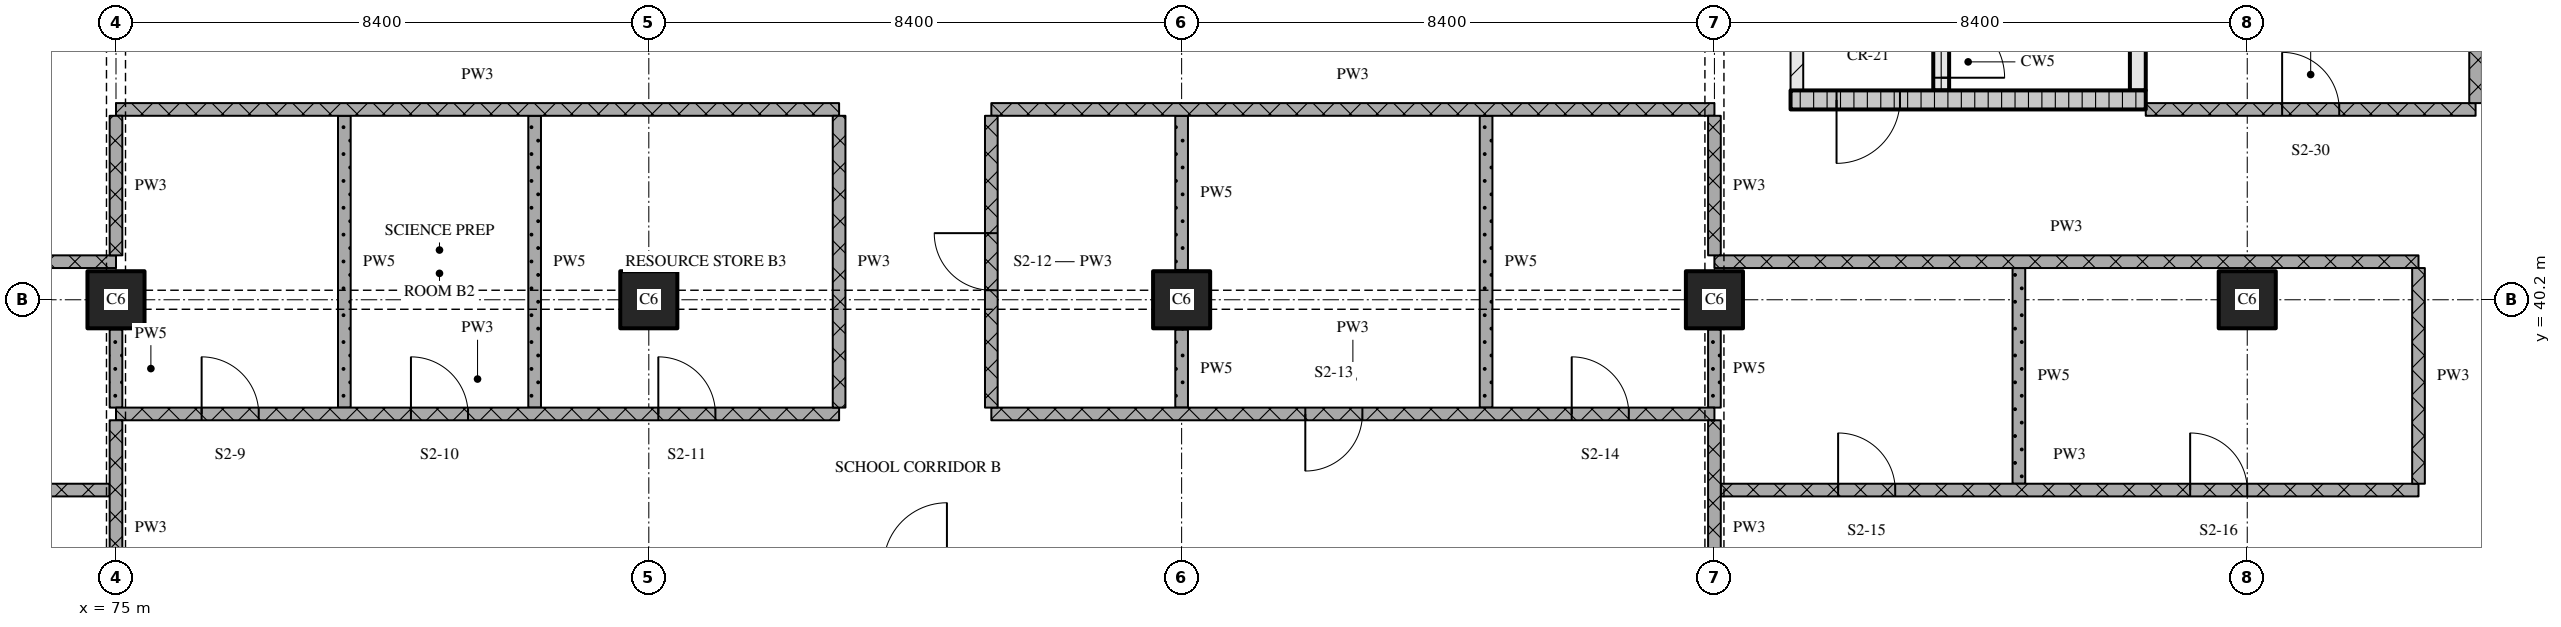
"""IFC4 building model, lengths in metres.
Left out: names, types, materials, properties, quantities, classifications, styles, units other than length and angle.
Written with IfcOpenShell. Run it as: python <this file> out.ifc"""

import sys

from ifc_helpers import new_model, si_unit, direction, frame, frame_2d, origin, origin_2d, place, context, subcontext, project, spatial, rectangle, extrude, element, fill, save


model = new_model("IFC4")
c1 = context("Model", 3, precision=1e-05, world=origin(), true_north=direction((0.0, 1.0)))
c2 = subcontext(c1, "Body", "Model", "MODEL_VIEW")
j1 = project(units=[si_unit("LENGTHUNIT", "METRE"), si_unit("PLANEANGLEUNIT", "RADIAN")], contexts=[c1])
p1 = place(None, origin())
s1 = spatial("IfcSite", under=j1, at=p1, CompositionType="ELEMENT")
p2 = place(p1, origin())
s2 = spatial("IfcBuilding", under=s1, at=p2, CompositionType="ELEMENT")
p3 = place(p2, frame((0.0, 0.0, 28.2)))
s3 = spatial("IfcBuildingStorey", under=s2, at=p3, CompositionType="ELEMENT", Elevation=28.2)
for number, where, z_axis, x_axis in (
    (1, (75.0, 40.2, 0.0), (0.0, 0.0, 1.0), (1.0, 0.0, 0.0)),
    (2, (83.4, 40.2, 0.0), (0.0, 0.0, 1.0), (1.0, 0.0, 0.0)),
    (3, (91.8, 40.2, 0.0), (0.0, 0.0, 1.0), (1.0, 0.0, 0.0)),
    (4, (100.2, 40.2, 0.0), (0.0, 0.0, 1.0), (1.0, 0.0, 0.0)),
    (5, (108.6, 40.2, 0.0), (0.0, 0.0, 1.0), (1.0, 0.0, 0.0)),
):
    element("IfcColumn", number, at=place(p3, frame(where, z_axis=z_axis, x_axis=x_axis)), inside=s3, PredefinedType="COLUMN", context=c2, shape_type="SweptSolid", body=[
        extrude(rectangle(XDim=0.9, YDim=0.9, at=origin_2d()), origin(), (0.0, 0.0, 1.0), 4.5),
    ])
p4 = place(p3, frame((101.4, 43.35, 0.0), z_axis=(0.0, 0.0, 1.0), x_axis=(1.0, 0.0, 0.0)))
e6 = element("IfcWall", 6, at=p4, inside=s3, PredefinedType="SOLIDWALL", context=c2, shape_type="SweptSolid", body=[
    extrude(rectangle(XDim=5.6, YDim=0.3, at=frame_2d((2.8, 0.0))), origin(), (0.0, 0.0, 1.0), 4.2),
])
p5 = place(p4, frame((0.725, 0.0, 0.0)))
e7 = element("IfcOpeningElement", 7, at=p5, cuts=e6, PredefinedType="OPENING", context=c2, shape_type="SweptSolid", body=[
    extrude(rectangle(XDim=1.0, YDim=2.1, at=frame_2d((0.5, 1.05))), frame((0.0, 0.16, 0.0), z_axis=(0.0, -1.0, 0.0), x_axis=(1.0, 0.0, 0.0)), (0.0, 0.0, 1.0), 0.32),
])
p6 = place(p3, frame((101.5, 43.5, 0.0), z_axis=(0.0, 0.0, 1.0), x_axis=(0.0, 1.0, 0.0)))
e8 = element("IfcWall", 8, at=p6, inside=s3, PredefinedType="PARTITIONING", context=c2, shape_type="SweptSolid", body=[
    extrude(rectangle(XDim=6.9, YDim=0.2, at=frame_2d((3.45, 0.0))), origin(), (0.0, 0.0, 1.0), 4.2),
])
p7 = place(p6, frame((1.0, 0.0, 0.0)))
e9 = element("IfcOpeningElement", 9, at=p7, cuts=e8, PredefinedType="OPENING", context=c2, shape_type="SweptSolid", body=[
    extrude(rectangle(XDim=1.0, YDim=2.1, at=frame_2d((0.5, 1.05))), frame((0.0, 0.11, 0.0), z_axis=(0.0, -1.0, 0.0), x_axis=(1.0, 0.0, 0.0)), (0.0, 0.0, 1.0), 0.22),
])
p8 = place(p3, frame((103.775, 43.5, 0.0), z_axis=(0.0, 0.0, 1.0), x_axis=(0.0, 1.0, 0.0)))
e10 = element("IfcWall", 10, at=p8, inside=s3, PredefinedType="SOLIDWALL", context=c2, shape_type="SweptSolid", body=[
    extrude(rectangle(XDim=6.9, YDim=0.25, at=frame_2d((3.45, 0.0))), origin(), (0.0, 0.0, 1.0), 4.2),
])
p9 = place(p8, frame((0.2, 0.0, 0.0)))
e11 = element("IfcOpeningElement", 11, at=p9, cuts=e10, PredefinedType="OPENING", context=c2, shape_type="SweptSolid", body=[
    extrude(rectangle(XDim=1.0, YDim=2.1, at=frame_2d((0.5, 1.05))), frame((0.0, 0.135, 0.0), z_axis=(0.0, -1.0, 0.0), x_axis=(1.0, 0.0, 0.0)), (0.0, 0.0, 1.0), 0.27),
])
p10 = place(p3, frame((106.875, 43.5, 0.0), z_axis=(0.0, 0.0, 1.0), x_axis=(0.0, 1.0, 0.0)))
e12 = element("IfcWall", 12, at=p10, inside=s3, PredefinedType="SOLIDWALL", context=c2, shape_type="SweptSolid", body=[
    extrude(rectangle(XDim=6.9, YDim=0.25, at=frame_2d((3.45, 0.0))), origin(), (0.0, 0.0, 1.0), 4.2),
])
p11 = place(p3, frame((63.9, 37.2, 0.0), z_axis=(0.0, 0.0, 1.0), x_axis=(1.0, 0.0, 0.0)))
e13 = element("IfcWall", 13, at=p11, inside=s3, PredefinedType="PARTITIONING", context=c2, shape_type="SweptSolid", body=[
    extrude(rectangle(XDim=11.0, YDim=0.2, at=frame_2d((5.5, 0.0))), origin(), (0.0, 0.0, 1.0), 4.2),
])
p12 = place(p11, frame((7.5, 0.0, 0.0)))
e14 = element("IfcOpeningElement", 14, at=p12, cuts=e13, PredefinedType="OPENING", context=c2, shape_type="SweptSolid", body=[
    extrude(rectangle(XDim=0.9, YDim=2.1, at=frame_2d((0.45, 1.05))), frame((0.0, 0.11, 0.0), z_axis=(0.0, -1.0, 0.0), x_axis=(1.0, 0.0, 0.0)), (0.0, 0.0, 1.0), 0.22),
])
p13 = place(p3, frame((100.3, 37.2, 0.0), z_axis=(0.0, 0.0, 1.0), x_axis=(1.0, 0.0, 0.0)))
e15 = element("IfcWall", 15, at=p13, inside=s3, PredefinedType="PARTITIONING", context=c2, shape_type="SweptSolid", body=[
    extrude(rectangle(XDim=11.0, YDim=0.2, at=frame_2d((5.5, 0.0))), origin(), (0.0, 0.0, 1.0), 4.2),
])
p14 = place(p13, frame((1.85, 0.0, 0.0)))
e16 = element("IfcOpeningElement", 16, at=p14, cuts=e15, PredefinedType="OPENING", context=c2, shape_type="SweptSolid", body=[
    extrude(rectangle(XDim=0.9, YDim=2.1, at=frame_2d((0.45, 1.05))), frame((0.0, 0.11, 0.0), z_axis=(0.0, -1.0, 0.0), x_axis=(1.0, 0.0, 0.0)), (0.0, 0.0, 1.0), 0.22),
])
p15 = place(p13, frame((7.4, 0.0, 0.0)))
e17 = element("IfcOpeningElement", 17, at=p15, cuts=e15, PredefinedType="OPENING", context=c2, shape_type="SweptSolid", body=[
    extrude(rectangle(XDim=0.9, YDim=2.1, at=frame_2d((0.45, 1.05))), frame((0.0, 0.11, 0.0), z_axis=(0.0, -1.0, 0.0), x_axis=(1.0, 0.0, 0.0)), (0.0, 0.0, 1.0), 0.22),
])
p16 = place(p3, frame((75.0, 38.4, 0.0), z_axis=(0.0, 0.0, 1.0), x_axis=(1.0, 0.0, 0.0)))
e18 = element("IfcWall", 18, at=p16, inside=s3, PredefinedType="PARTITIONING", context=c2, shape_type="SweptSolid", body=[
    extrude(rectangle(XDim=11.4, YDim=0.2, at=frame_2d((5.7, 0.0))), origin(), (0.0, 0.0, 1.0), 4.2),
])
p17 = place(p16, frame((1.35, 0.0, 0.0)))
e19 = element("IfcOpeningElement", 19, at=p17, cuts=e18, PredefinedType="OPENING", context=c2, shape_type="SweptSolid", body=[
    extrude(rectangle(XDim=0.9, YDim=2.1, at=frame_2d((0.45, 1.05))), frame((0.0, 0.11, 0.0), z_axis=(0.0, -1.0, 0.0), x_axis=(1.0, 0.0, 0.0)), (0.0, 0.0, 1.0), 0.22),
])
p18 = place(p16, frame((4.65, 0.0, 0.0)))
e20 = element("IfcOpeningElement", 20, at=p18, cuts=e18, PredefinedType="OPENING", context=c2, shape_type="SweptSolid", body=[
    extrude(rectangle(XDim=0.9, YDim=2.1, at=frame_2d((0.45, 1.05))), frame((0.0, 0.11, 0.0), z_axis=(0.0, -1.0, 0.0), x_axis=(1.0, 0.0, 0.0)), (0.0, 0.0, 1.0), 0.22),
])
p19 = place(p16, frame((8.55, 0.0, 0.0)))
e21 = element("IfcOpeningElement", 21, at=p19, cuts=e18, PredefinedType="OPENING", context=c2, shape_type="SweptSolid", body=[
    extrude(rectangle(XDim=0.9, YDim=2.1, at=frame_2d((0.45, 1.05))), frame((0.0, 0.11, 0.0), z_axis=(0.0, -1.0, 0.0), x_axis=(1.0, 0.0, 0.0)), (0.0, 0.0, 1.0), 0.22),
])
p20 = place(p3, frame((88.8, 38.4, 0.0), z_axis=(0.0, 0.0, 1.0), x_axis=(1.0, 0.0, 0.0)))
e22 = element("IfcWall", 22, at=p20, inside=s3, PredefinedType="PARTITIONING", context=c2, shape_type="SweptSolid", body=[
    extrude(rectangle(XDim=11.4, YDim=0.2, at=frame_2d((5.7, 0.0))), origin(), (0.0, 0.0, 1.0), 4.2),
])
p21 = place(p20, frame((4.95, 0.0, 0.0)))
e23 = element("IfcOpeningElement", 23, at=p21, cuts=e22, PredefinedType="OPENING", context=c2, shape_type="SweptSolid", body=[
    extrude(rectangle(XDim=0.9, YDim=2.1, at=frame_2d((0.45, 1.05))), frame((0.0, 0.11, 0.0), z_axis=(0.0, -1.0, 0.0), x_axis=(1.0, 0.0, 0.0)), (0.0, 0.0, 1.0), 0.22),
])
p22 = place(p20, frame((9.15, 0.0, 0.0)))
e24 = element("IfcOpeningElement", 24, at=p22, cuts=e22, PredefinedType="OPENING", context=c2, shape_type="SweptSolid", body=[
    extrude(rectangle(XDim=0.9, YDim=2.1, at=frame_2d((0.45, 1.05))), frame((0.0, 0.11, 0.0), z_axis=(0.0, -1.0, 0.0), x_axis=(1.0, 0.0, 0.0)), (0.0, 0.0, 1.0), 0.22),
])
for number, where, z_axis, x_axis in (
    (25, (63.9, 40.8, 0.0), (0.0, 0.0, 1.0), (1.0, 0.0, 0.0)),
    (26, (100.2, 40.8, 0.0), (0.0, 0.0, 1.0), (1.0, 0.0, 0.0)),
):
    element("IfcWall", number, at=place(p3, frame(where, z_axis=z_axis, x_axis=x_axis)), inside=s3, PredefinedType="PARTITIONING", context=c2, shape_type="SweptSolid", body=[
        extrude(rectangle(XDim=11.1, YDim=0.2, at=frame_2d((5.55, 0.0))), origin(), (0.0, 0.0, 1.0), 4.2),
    ])
for number, where, z_axis, x_axis in (
    (27, (75.0, 43.2, 0.0), (0.0, 0.0, 1.0), (1.0, 0.0, 0.0)),
    (28, (88.8, 43.2, 0.0), (0.0, 0.0, 1.0), (1.0, 0.0, 0.0)),
):
    element("IfcWall", number, at=place(p3, frame(where, z_axis=z_axis, x_axis=x_axis)), inside=s3, PredefinedType="PARTITIONING", context=c2, shape_type="SweptSolid", body=[
        extrude(rectangle(XDim=11.4, YDim=0.2, at=frame_2d((5.7, 0.0))), origin(), (0.0, 0.0, 1.0), 4.2),
    ])
p23 = place(p3, frame((107.0, 43.2, 0.0), z_axis=(0.0, 0.0, 1.0), x_axis=(1.0, 0.0, 0.0)))
e29 = element("IfcWall", 29, at=p23, inside=s3, PredefinedType="PARTITIONING", context=c2, shape_type="SweptSolid", body=[
    extrude(rectangle(XDim=5.2, YDim=0.2, at=frame_2d((2.6, 0.0))), origin(), (0.0, 0.0, 1.0), 4.2),
])
p24 = place(p23, frame((2.15, 0.0, 0.0)))
e30 = element("IfcOpeningElement", 30, at=p24, cuts=e29, PredefinedType="OPENING", context=c2, shape_type="SweptSolid", body=[
    extrude(rectangle(XDim=0.9, YDim=2.1, at=frame_2d((0.45, 1.05))), frame((0.0, 0.11, 0.0), z_axis=(0.0, -1.0, 0.0), x_axis=(1.0, 0.0, 0.0)), (0.0, 0.0, 1.0), 0.22),
])
p25 = place(p3, frame((75.0, 38.3, 0.0), z_axis=(0.0, 0.0, 1.0), x_axis=(0.0, -1.0, 0.0)))
e31 = element("IfcWall", 31, at=p25, inside=s3, PredefinedType="PARTITIONING", context=c2, shape_type="SweptSolid", body=[
    extrude(rectangle(XDim=3.4, YDim=0.2, at=frame_2d((1.7, 0.0))), origin(), (0.0, 0.0, 1.0), 3.7),
])
p26 = place(p3, frame((75.0, 43.1, 0.0), z_axis=(0.0, 0.0, 1.0), x_axis=(0.0, -1.0, 0.0)))
e32 = element("IfcWall", 32, at=p26, inside=s3, PredefinedType="PARTITIONING", context=c2, shape_type="SweptSolid", body=[
    extrude(rectangle(XDim=2.2, YDim=0.2, at=frame_2d((1.1, 0.0))), origin(), (0.0, 0.0, 1.0), 3.3),
])
p27 = place(p3, frame((75.0, 39.73, 0.0), z_axis=(0.0, 0.0, 1.0), x_axis=(0.0, -1.0, 0.0)))
e33 = element("IfcWall", 33, at=p27, inside=s3, PredefinedType="PARTITIONING", context=c2, shape_type="SweptSolid", body=[
    extrude(rectangle(XDim=1.23, YDim=0.2, at=frame_2d((0.615, 0.0))), origin(), (0.0, 0.0, 1.0), 3.7),
])
for number, where, z_axis, x_axis in (
    (34, (78.6, 43.1, 0.0), (0.0, 0.0, 1.0), (0.0, -1.0, 0.0)),
    (35, (81.6, 43.1, 0.0), (0.0, 0.0, 1.0), (0.0, -1.0, 0.0)),
    (36, (86.4, 43.1, 0.0), (0.0, 0.0, 1.0), (0.0, -1.0, 0.0)),
):
    element("IfcWall", number, at=place(p3, frame(where, z_axis=z_axis, x_axis=x_axis)), inside=s3, PredefinedType="PARTITIONING", context=c2, shape_type="SweptSolid", body=[
        extrude(rectangle(XDim=4.6, YDim=0.2, at=frame_2d((2.3, 0.0))), origin(), (0.0, 0.0, 1.0), 4.2),
    ])
p28 = place(p3, frame((88.8, 43.1, 0.0), z_axis=(0.0, 0.0, 1.0), x_axis=(0.0, -1.0, 0.0)))
e37 = element("IfcWall", 37, at=p28, inside=s3, PredefinedType="PARTITIONING", context=c2, shape_type="SweptSolid", body=[
    extrude(rectangle(XDim=4.6, YDim=0.2, at=frame_2d((2.3, 0.0))), origin(), (0.0, 0.0, 1.0), 4.2),
])
p29 = place(p28, frame((1.85, 0.0, 0.0)))
e38 = element("IfcOpeningElement", 38, at=p29, cuts=e37, PredefinedType="OPENING", context=c2, shape_type="SweptSolid", body=[
    extrude(rectangle(XDim=0.9, YDim=2.1, at=frame_2d((0.45, 1.05))), frame((0.0, 0.11, 0.0), z_axis=(0.0, -1.0, 0.0), x_axis=(1.0, 0.0, 0.0)), (0.0, 0.0, 1.0), 0.22),
])
p30 = place(p3, frame((91.8, 39.73, 0.0), z_axis=(0.0, 0.0, 1.0), x_axis=(0.0, -1.0, 0.0)))
e39 = element("IfcWall", 39, at=p30, inside=s3, PredefinedType="PARTITIONING", context=c2, shape_type="SweptSolid", body=[
    extrude(rectangle(XDim=1.23, YDim=0.2, at=frame_2d((0.615, 0.0))), origin(), (0.0, 0.0, 1.0), 4.2),
])
p31 = place(p3, frame((91.8, 43.1, 0.0), z_axis=(0.0, 0.0, 1.0), x_axis=(0.0, -1.0, 0.0)))
e40 = element("IfcWall", 40, at=p31, inside=s3, PredefinedType="PARTITIONING", context=c2, shape_type="SweptSolid", body=[
    extrude(rectangle(XDim=2.43, YDim=0.2, at=frame_2d((1.215, 0.0))), origin(), (0.0, 0.0, 1.0), 4.2),
])
p32 = place(p3, frame((96.6, 43.1, 0.0), z_axis=(0.0, 0.0, 1.0), x_axis=(0.0, -1.0, 0.0)))
e41 = element("IfcWall", 41, at=p32, inside=s3, PredefinedType="PARTITIONING", context=c2, shape_type="SweptSolid", body=[
    extrude(rectangle(XDim=4.6, YDim=0.2, at=frame_2d((2.3, 0.0))), origin(), (0.0, 0.0, 1.0), 4.2),
])
p33 = place(p3, frame((100.2, 38.3, 0.0), z_axis=(0.0, 0.0, 1.0), x_axis=(0.0, -1.0, 0.0)))
e42 = element("IfcWall", 42, at=p33, inside=s3, PredefinedType="PARTITIONING", context=c2, shape_type="SweptSolid", body=[
    extrude(rectangle(XDim=3.4, YDim=0.2, at=frame_2d((1.7, 0.0))), origin(), (0.0, 0.0, 1.0), 3.7),
])
p34 = place(p3, frame((100.2, 43.1, 0.0), z_axis=(0.0, 0.0, 1.0), x_axis=(0.0, -1.0, 0.0)))
e43 = element("IfcWall", 43, at=p34, inside=s3, PredefinedType="PARTITIONING", context=c2, shape_type="SweptSolid", body=[
    extrude(rectangle(XDim=2.2, YDim=0.2, at=frame_2d((1.1, 0.0))), origin(), (0.0, 0.0, 1.0), 3.3),
])
p35 = place(p3, frame((100.2, 39.73, 0.0), z_axis=(0.0, 0.0, 1.0), x_axis=(0.0, -1.0, 0.0)))
e44 = element("IfcWall", 44, at=p35, inside=s3, PredefinedType="PARTITIONING", context=c2, shape_type="SweptSolid", body=[
    extrude(rectangle(XDim=1.23, YDim=0.2, at=frame_2d((0.615, 0.0))), origin(), (0.0, 0.0, 1.0), 3.7),
])
for number, where, z_axis, x_axis in (
    (45, (105.0, 40.7, 0.0), (0.0, 0.0, 1.0), (0.0, -1.0, 0.0)),
    (46, (111.3, 40.7, 0.0), (0.0, 0.0, 1.0), (0.0, -1.0, 0.0)),
):
    element("IfcWall", number, at=place(p3, frame(where, z_axis=z_axis, x_axis=x_axis)), inside=s3, PredefinedType="PARTITIONING", context=c2, shape_type="SweptSolid", body=[
        extrude(rectangle(XDim=3.4, YDim=0.2, at=frame_2d((1.7, 0.0))), origin(), (0.0, 0.0, 1.0), 4.2),
    ])
p36 = place(p3, frame((112.2, 43.3, 0.0), z_axis=(0.0, 0.0, 1.0), x_axis=(0.0, 1.0, 0.0)))
e47 = element("IfcWall", 47, at=p36, inside=s3, PredefinedType="PARTITIONING", context=c2, shape_type="SweptSolid", body=[
    extrude(rectangle(XDim=15.4, YDim=0.2, at=frame_2d((7.7, 0.0))), origin(), (0.0, 0.0, 1.0), 4.2),
])
p37 = place(p36, frame((7.962, 0.0, 0.0)))
e48 = element("IfcOpeningElement", 48, at=p37, cuts=e47, PredefinedType="OPENING", context=c2, shape_type="SweptSolid", body=[
    extrude(rectangle(XDim=0.9, YDim=2.1, at=frame_2d((0.45, 1.05))), frame((0.0, 0.11, 0.0), z_axis=(0.0, -1.0, 0.0), x_axis=(1.0, 0.0, 0.0)), (0.0, 0.0, 1.0), 0.22),
])
p38 = place(p36, frame((9.988, 0.0, 0.0)))
e49 = element("IfcOpeningElement", 49, at=p38, cuts=e47, PredefinedType="OPENING", context=c2, shape_type="SweptSolid", body=[
    extrude(rectangle(XDim=0.9, YDim=2.1, at=frame_2d((0.45, 1.05))), frame((0.0, 0.11, 0.0), z_axis=(0.0, -1.0, 0.0), x_axis=(1.0, 0.0, 0.0)), (0.0, 0.0, 1.0), 0.22),
])
p39 = place(p36, frame((12.012, 0.0, 0.0)))
e50 = element("IfcOpeningElement", 50, at=p39, cuts=e47, PredefinedType="OPENING", context=c2, shape_type="SweptSolid", body=[
    extrude(rectangle(XDim=0.9, YDim=2.1, at=frame_2d((0.45, 1.05))), frame((0.0, 0.11, 0.0), z_axis=(0.0, -1.0, 0.0), x_axis=(1.0, 0.0, 0.0)), (0.0, 0.0, 1.0), 0.22),
])
p40 = place(p36, frame((14.038, 0.0, 0.0)))
e51 = element("IfcOpeningElement", 51, at=p40, cuts=e47, PredefinedType="OPENING", context=c2, shape_type="SweptSolid", body=[
    extrude(rectangle(XDim=0.9, YDim=2.1, at=frame_2d((0.45, 1.05))), frame((0.0, 0.11, 0.0), z_axis=(0.0, -1.0, 0.0), x_axis=(1.0, 0.0, 0.0)), (0.0, 0.0, 1.0), 0.22),
])
p41 = place(p5, origin())
e52 = element("IfcDoor", 52, at=p41, inside=s3, OperationType="SINGLE_SWING_RIGHT", PredefinedType="DOOR", context=c2, shape_type="SweptSolid", body=[
    extrude(rectangle(XDim=1.0, YDim=2.1, at=frame_2d((0.5, 1.05))), frame((0.0, 0.025, 0.0), z_axis=(0.0, -1.0, 0.0), x_axis=(1.0, 0.0, 0.0)), (0.0, 0.0, 1.0), 0.05),
])
fill(e7, e52)
p42 = place(p9, origin())
e53 = element("IfcDoor", 53, at=p42, inside=s3, OperationType="SINGLE_SWING_RIGHT", PredefinedType="DOOR", context=c2, shape_type="SweptSolid", body=[
    extrude(rectangle(XDim=1.0, YDim=2.1, at=frame_2d((0.5, 1.05))), frame((0.0, 0.025, 0.0), z_axis=(0.0, -1.0, 0.0), x_axis=(1.0, 0.0, 0.0)), (0.0, 0.0, 1.0), 0.05),
])
fill(e11, e53)
p43 = place(p14, origin())
e54 = element("IfcDoor", 54, at=p43, inside=s3, OperationType="SINGLE_SWING_LEFT", PredefinedType="DOOR", context=c2, shape_type="SweptSolid", body=[
    extrude(rectangle(XDim=0.9, YDim=2.1, at=frame_2d((0.45, 1.05))), frame((0.0, 0.025, 0.0), z_axis=(0.0, -1.0, 0.0), x_axis=(1.0, 0.0, 0.0)), (0.0, 0.0, 1.0), 0.05),
])
fill(e16, e54)
p44 = place(p15, origin())
e55 = element("IfcDoor", 55, at=p44, inside=s3, OperationType="SINGLE_SWING_LEFT", PredefinedType="DOOR", context=c2, shape_type="SweptSolid", body=[
    extrude(rectangle(XDim=0.9, YDim=2.1, at=frame_2d((0.45, 1.05))), frame((0.0, 0.025, 0.0), z_axis=(0.0, -1.0, 0.0), x_axis=(1.0, 0.0, 0.0)), (0.0, 0.0, 1.0), 0.05),
])
fill(e17, e55)
p45 = place(p17, origin())
e56 = element("IfcDoor", 56, at=p45, inside=s3, OperationType="SINGLE_SWING_LEFT", PredefinedType="DOOR", context=c2, shape_type="SweptSolid", body=[
    extrude(rectangle(XDim=0.9, YDim=2.1, at=frame_2d((0.45, 1.05))), frame((0.0, 0.025, 0.0), z_axis=(0.0, -1.0, 0.0), x_axis=(1.0, 0.0, 0.0)), (0.0, 0.0, 1.0), 0.05),
])
fill(e19, e56)
p46 = place(p18, origin())
e57 = element("IfcDoor", 57, at=p46, inside=s3, OperationType="SINGLE_SWING_LEFT", PredefinedType="DOOR", context=c2, shape_type="SweptSolid", body=[
    extrude(rectangle(XDim=0.9, YDim=2.1, at=frame_2d((0.45, 1.05))), frame((0.0, 0.025, 0.0), z_axis=(0.0, -1.0, 0.0), x_axis=(1.0, 0.0, 0.0)), (0.0, 0.0, 1.0), 0.05),
])
fill(e20, e57)
p47 = place(p19, origin())
e58 = element("IfcDoor", 58, at=p47, inside=s3, OperationType="SINGLE_SWING_LEFT", PredefinedType="DOOR", context=c2, shape_type="SweptSolid", body=[
    extrude(rectangle(XDim=0.9, YDim=2.1, at=frame_2d((0.45, 1.05))), frame((0.0, 0.025, 0.0), z_axis=(0.0, -1.0, 0.0), x_axis=(1.0, 0.0, 0.0)), (0.0, 0.0, 1.0), 0.05),
])
fill(e21, e58)
p48 = place(p21, origin())
e59 = element("IfcDoor", 59, at=p48, inside=s3, OperationType="SINGLE_SWING_RIGHT", PredefinedType="DOOR", context=c2, shape_type="SweptSolid", body=[
    extrude(rectangle(XDim=0.9, YDim=2.1, at=frame_2d((0.45, 1.05))), frame((0.0, 0.025, 0.0), z_axis=(0.0, -1.0, 0.0), x_axis=(1.0, 0.0, 0.0)), (0.0, 0.0, 1.0), 0.05),
])
fill(e23, e59)
p49 = place(p22, origin())
e60 = element("IfcDoor", 60, at=p49, inside=s3, OperationType="SINGLE_SWING_LEFT", PredefinedType="DOOR", context=c2, shape_type="SweptSolid", body=[
    extrude(rectangle(XDim=0.9, YDim=2.1, at=frame_2d((0.45, 1.05))), frame((0.0, 0.025, 0.0), z_axis=(0.0, -1.0, 0.0), x_axis=(1.0, 0.0, 0.0)), (0.0, 0.0, 1.0), 0.05),
])
fill(e24, e60)
p50 = place(p24, origin())
e61 = element("IfcDoor", 61, at=p50, inside=s3, OperationType="SINGLE_SWING_LEFT", PredefinedType="DOOR", context=c2, shape_type="SweptSolid", body=[
    extrude(rectangle(XDim=0.9, YDim=2.1, at=frame_2d((0.45, 1.05))), frame((0.0, 0.025, 0.0), z_axis=(0.0, -1.0, 0.0), x_axis=(1.0, 0.0, 0.0)), (0.0, 0.0, 1.0), 0.05),
])
fill(e30, e61)
p51 = place(p29, origin())
e62 = element("IfcDoor", 62, at=p51, inside=s3, OperationType="SINGLE_SWING_RIGHT", PredefinedType="DOOR", context=c2, shape_type="SweptSolid", body=[
    extrude(rectangle(XDim=0.9, YDim=2.1, at=frame_2d((0.45, 1.05))), frame((0.0, 0.025, 0.0), z_axis=(0.0, -1.0, 0.0), x_axis=(1.0, 0.0, 0.0)), (0.0, 0.0, 1.0), 0.05),
])
fill(e38, e62)
save(model, sys.argv[1])
